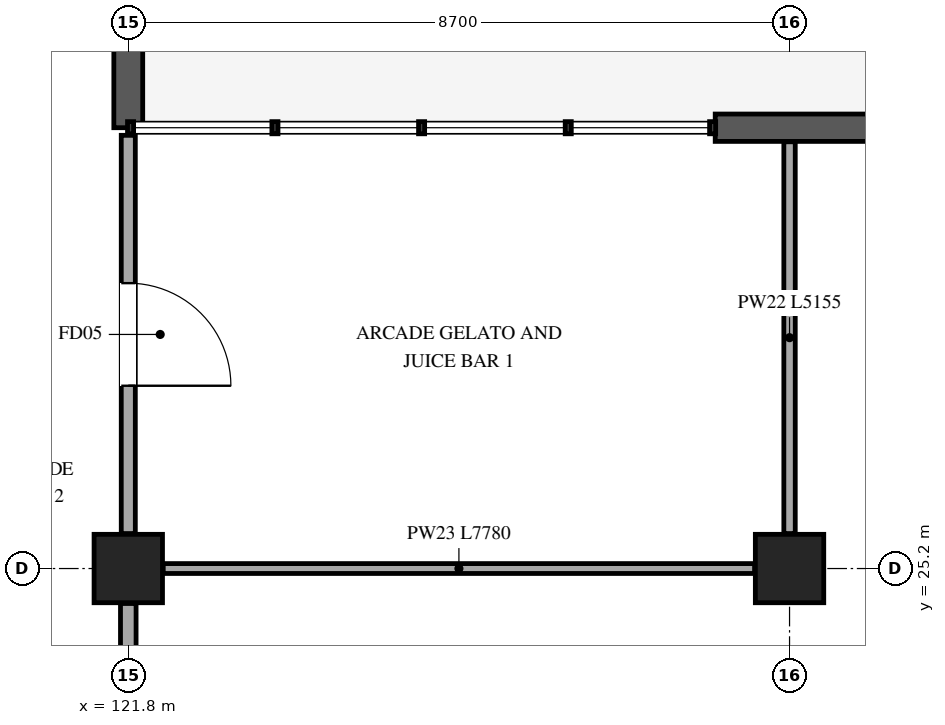
"""IFC4 building model, lengths in metres.
Left out: names, types, materials, properties, quantities, classifications, styles, units other than length and angle.
Written with IfcOpenShell. Run it as: python <this file> out.ifc"""

import sys

from ifc_helpers import new_model, si_unit, direction, frame, frame_2d, origin, origin_2d, place, context, subcontext, project, spatial, rectangle, extrude, element, fill, save


model = new_model("IFC4")
c1 = context("Model", 3, precision=1e-05, world=origin(), true_north=direction((0.0, 1.0)))
c2 = subcontext(c1, "Body", "Model", "MODEL_VIEW")
j1 = project(units=[si_unit("LENGTHUNIT", "METRE"), si_unit("PLANEANGLEUNIT", "RADIAN")], contexts=[c1])
p1 = place(None, origin())
s1 = spatial("IfcSite", under=j1, at=p1, CompositionType="ELEMENT")
p2 = place(p1, origin())
s2 = spatial("IfcBuilding", under=s1, at=p2, CompositionType="ELEMENT")
p3 = place(p2, frame((0.0, 0.0, 11.4)))
s3 = spatial("IfcBuildingStorey", under=s2, at=p3, CompositionType="ELEMENT", Elevation=11.4)
for number, where, z_axis, x_axis in (
    (1, (121.8, 25.2, 0.0), (0.0, 0.0, 1.0), (1.0, 0.0, 0.0)),
    (2, (130.5, 25.2, 0.0), (0.0, 0.0, 1.0), (1.0, 0.0, 0.0)),
):
    element("IfcColumn", number, at=place(p3, frame(where, z_axis=z_axis, x_axis=x_axis)), inside=s3, PredefinedType="COLUMN", context=c2, shape_type="SweptSolid", body=[
        extrude(rectangle(XDim=0.9, YDim=0.9, at=origin_2d()), origin(), (0.0, 0.0, 1.0), 5.1),
    ])
p4 = place(p3, frame((121.8, 33.148, 0.0), z_axis=(0.0, 0.0, 1.0), x_axis=(0.0, -1.0, 0.0)))
e3 = element("IfcWall", 3, at=p4, inside=s3, PredefinedType="STANDARD", context=c2, shape_type="SweptSolid", body=[
    extrude(rectangle(XDim=2.148, YDim=0.38, at=frame_2d((1.074, 0.0))), origin(), (0.0, 0.0, 1.0), 4.79),
])
p5 = place(p3, frame((129.522, 31.0, 0.0), z_axis=(0.0, 0.0, 1.0), x_axis=(1.0, 0.0, 0.0)))
e4 = element("IfcWall", 4, at=p5, inside=s3, PredefinedType="STANDARD", context=c2, shape_type="SweptSolid", body=[
    extrude(rectangle(XDim=7.716, YDim=0.36, at=frame_2d((3.858, 0.0))), origin(), (0.0, 0.0, 1.0), 4.79),
])
p6 = place(p5, frame((3.189, 0.0, 0.85)))
e5 = element("IfcOpeningElement", 5, at=p6, cuts=e4, PredefinedType="OPENING", context=c2, shape_type="SweptSolid", body=[
    extrude(rectangle(XDim=2.6, YDim=2.15, at=frame_2d((1.3, 1.075))), frame((0.0, 0.19, 0.0), z_axis=(0.0, -1.0, 0.0), x_axis=(1.0, 0.0, 0.0)), (0.0, 0.0, 1.0), 0.38),
])
p7 = place(p3, frame((121.8, 30.9, 0.0), z_axis=(0.0, 0.0, 1.0), x_axis=(0.0, -1.0, 0.0)))
e6 = element("IfcWall", 6, at=p7, inside=s3, PredefinedType="PARTITIONING", context=c2, shape_type="SweptSolid", body=[
    extrude(rectangle(XDim=5.24, YDim=0.185, at=frame_2d((2.62, 0.0))), origin(), (0.0, 0.0, 1.0), 4.06),
])
p8 = place(p7, frame((1.945, 0.0, 0.0)))
e7 = element("IfcOpeningElement", 7, at=p8, cuts=e6, PredefinedType="OPENING", context=c2, shape_type="SweptSolid", body=[
    extrude(rectangle(XDim=1.35, YDim=2.2, at=frame_2d((0.675, 1.1))), frame((0.0, 0.103, 0.0), z_axis=(0.0, -1.0, 0.0), x_axis=(1.0, 0.0, 0.0)), (0.0, 0.0, 1.0), 0.205),
])
p9 = place(p3, frame((121.8, 24.74, 0.0), z_axis=(0.0, 0.0, 1.0), x_axis=(0.0, -1.0, 0.0)))
e8 = element("IfcWall", 8, at=p9, inside=s3, PredefinedType="PARTITIONING", context=c2, shape_type="SweptSolid", body=[
    extrude(rectangle(XDim=7.48, YDim=0.205, at=frame_2d((3.74, 0.0))), origin(), (0.0, 0.0, 1.0), 4.145),
])
p10 = place(p3, frame((130.5, 30.815, 0.0), z_axis=(0.0, 0.0, 1.0), x_axis=(0.0, -1.0, 0.0)))
e9 = element("IfcWall", 9, at=p10, inside=s3, PredefinedType="PARTITIONING", context=c2, shape_type="SweptSolid", body=[
    extrude(rectangle(XDim=5.155, YDim=0.15, at=frame_2d((2.578, 0.0))), origin(), (0.0, 0.0, 1.0), 4.06),
])
p11 = place(p3, frame((130.04, 25.2, 0.0), z_axis=(0.0, 0.0, 1.0), x_axis=(-1.0, 0.0, 0.0)))
e10 = element("IfcWall", 10, at=p11, inside=s3, PredefinedType="PARTITIONING", context=c2, shape_type="SweptSolid", body=[
    extrude(rectangle(XDim=7.78, YDim=0.13, at=frame_2d((3.89, 0.0))), origin(), (0.0, 0.0, 1.0), 4.045),
])
p12 = place(p8, origin())
e11 = element("IfcDoor", 11, at=p12, inside=s3, OperationType="SINGLE_SWING_RIGHT", PredefinedType="DOOR", context=c2, shape_type="SweptSolid", body=[
    extrude(rectangle(XDim=1.35, YDim=2.2, at=frame_2d((0.675, 1.1))), frame((0.0, 0.025, 0.0), z_axis=(0.0, -1.0, 0.0), x_axis=(1.0, 0.0, 0.0)), (0.0, 0.0, 1.0), 0.05),
])
fill(e7, e11)
save(model, sys.argv[1])
